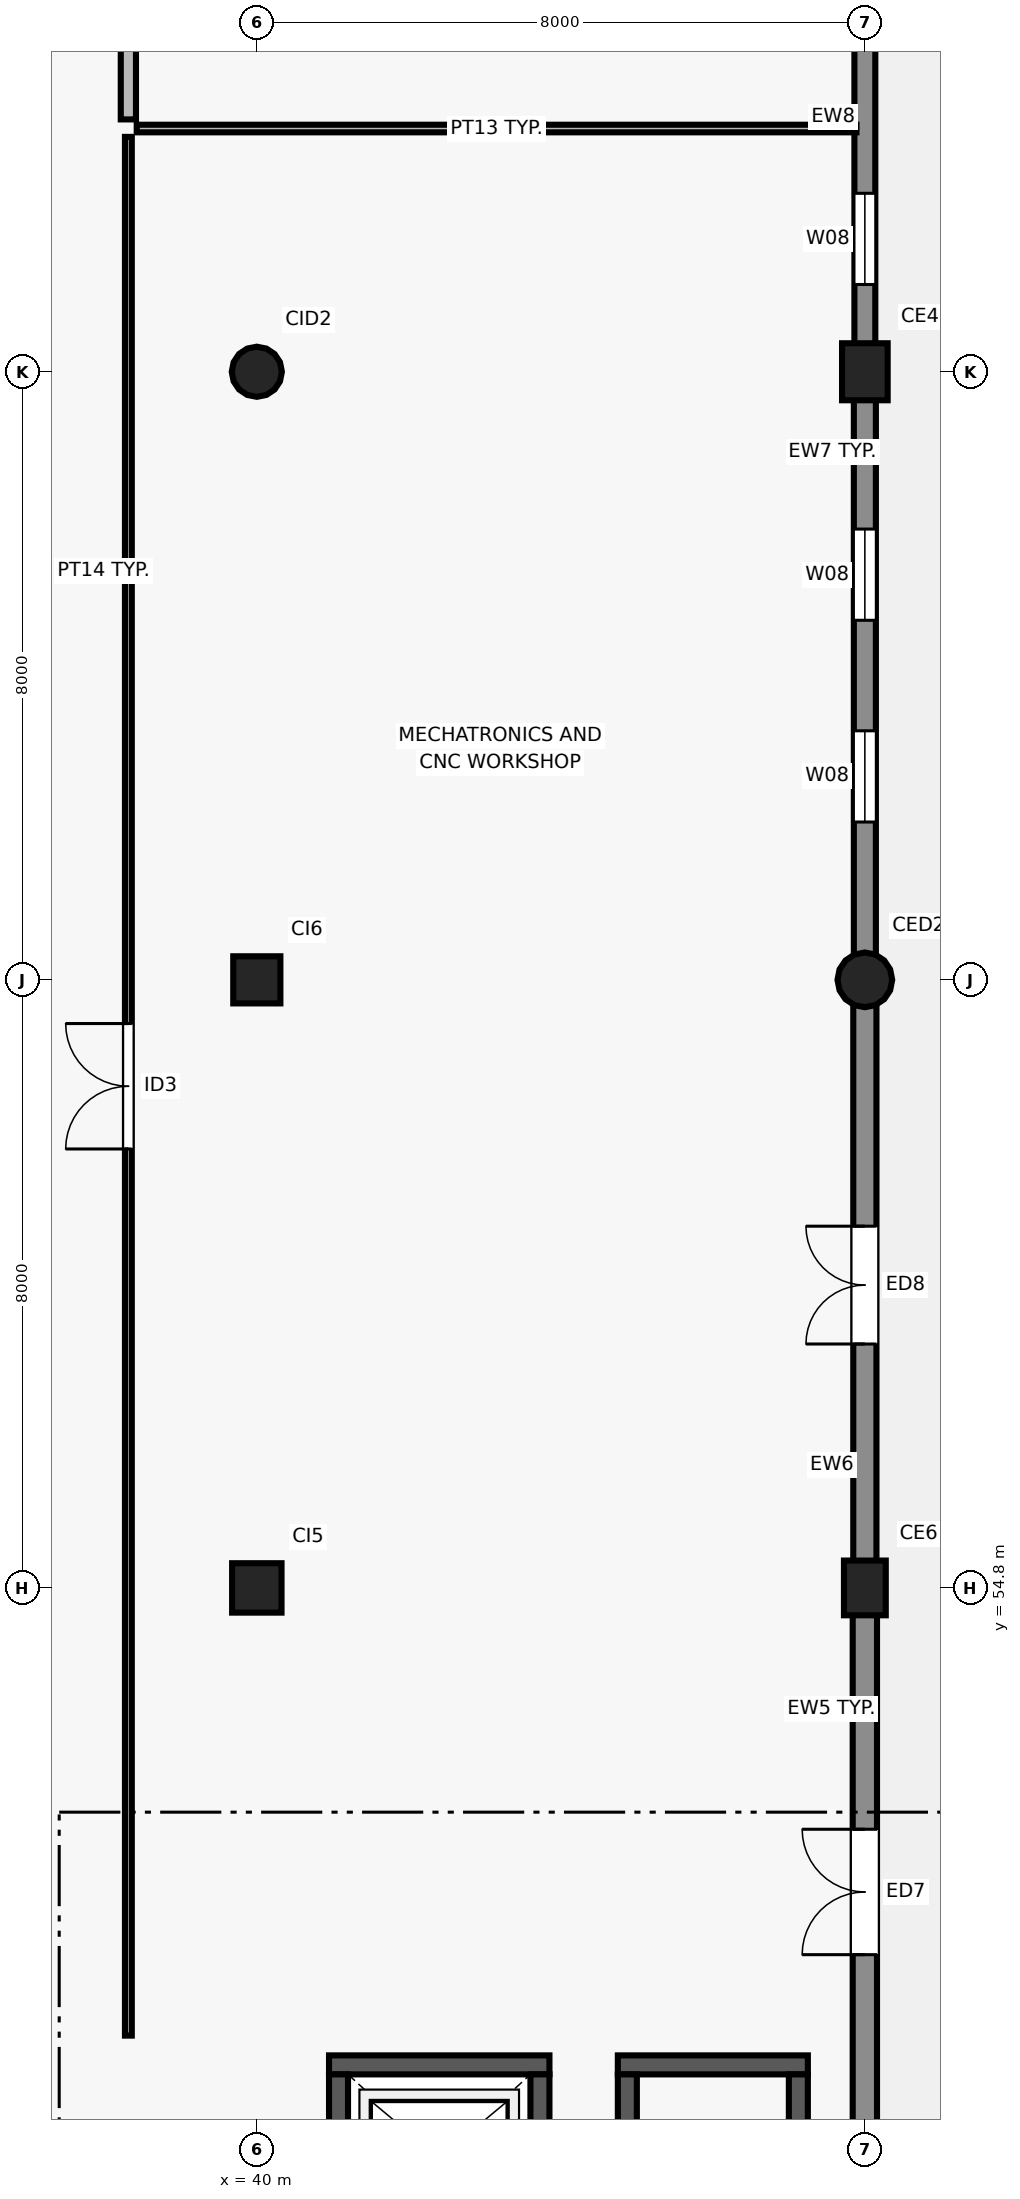
"""IFC4 building model, lengths in metres.
Left out: names, types, materials, properties, quantities, classifications, styles, units other than length and angle.
Written with IfcOpenShell. Run it as: python <this file> out.ifc"""

import sys

from ifc_helpers import new_model, si_unit, direction, frame, frame_2d, origin, origin_2d, place, context, subcontext, project, spatial, rectangle, circle, extrude, element, fill, save


model = new_model("IFC4")
c1 = context("Model", 3, precision=1e-05, world=origin(), true_north=direction((0.0, 1.0)))
c2 = subcontext(c1, "Body", "Model", "MODEL_VIEW")
j1 = project(units=[si_unit("LENGTHUNIT", "METRE"), si_unit("PLANEANGLEUNIT", "RADIAN")], contexts=[c1])
p1 = place(None, origin())
s1 = spatial("IfcSite", under=j1, at=p1, CompositionType="ELEMENT")
p2 = place(p1, origin())
s2 = spatial("IfcBuilding", under=s1, at=p2, CompositionType="ELEMENT")
p3 = place(p2, frame((0.0, 0.0, 9.0)))
s3 = spatial("IfcBuildingStorey", under=s2, at=p3, CompositionType="ELEMENT", Elevation=9.0)
p4 = place(p3, frame((40.0, 54.8, 0.0), z_axis=(0.0, 0.0, 1.0), x_axis=(1.0, 0.0, 0.0)))
e1 = element("IfcColumn", 1, at=p4, inside=s3, PredefinedType="COLUMN", context=c2, shape_type="SweptSolid", body=[
    extrude(rectangle(XDim=0.65, YDim=0.65, at=origin_2d()), origin(), (0.0, 0.0, 1.0), 4.2),
])
p5 = place(p3, frame((40.0, 62.8, 0.0), z_axis=(0.0, 0.0, 1.0), x_axis=(1.0, 0.0, 0.0)))
e2 = element("IfcColumn", 2, at=p5, inside=s3, PredefinedType="COLUMN", context=c2, shape_type="SweptSolid", body=[
    extrude(rectangle(XDim=0.62, YDim=0.62, at=origin_2d()), origin(), (0.0, 0.0, 1.0), 4.2),
])
p6 = place(p3, frame((40.0, 70.8, 0.0), z_axis=(0.0, 0.0, 1.0), x_axis=(1.0, 0.0, 0.0)))
e3 = element("IfcColumn", 3, at=p6, inside=s3, PredefinedType="COLUMN", context=c2, shape_type="SweptSolid", body=[
    extrude(circle(Radius=0.33, at=origin_2d()), origin(), (0.0, 0.0, 1.0), 4.2),
])
p7 = place(p3, frame((48.0, 54.8, 0.0), z_axis=(0.0, 0.0, 1.0), x_axis=(1.0, 0.0, 0.0)))
e4 = element("IfcColumn", 4, at=p7, inside=s3, PredefinedType="COLUMN", context=c2, shape_type="SweptSolid", body=[
    extrude(rectangle(XDim=0.72, YDim=0.55, at=origin_2d()), origin(), (0.0, 0.0, 1.0), 4.2),
])
p8 = place(p3, frame((48.0, 62.8, 0.0), z_axis=(0.0, 0.0, 1.0), x_axis=(1.0, 0.0, 0.0)))
e5 = element("IfcColumn", 5, at=p8, inside=s3, PredefinedType="COLUMN", context=c2, shape_type="SweptSolid", body=[
    extrude(circle(Radius=0.36, at=origin_2d()), origin(), (0.0, 0.0, 1.0), 4.2),
])
p9 = place(p3, frame((48.0, 70.8, 0.0), z_axis=(0.0, 0.0, 1.0), x_axis=(1.0, 0.0, 0.0)))
e6 = element("IfcColumn", 6, at=p9, inside=s3, PredefinedType="COLUMN", context=c2, shape_type="SweptSolid", body=[
    extrude(rectangle(XDim=0.75, YDim=0.6, at=origin_2d()), origin(), (0.0, 0.0, 1.0), 4.2),
])
p10 = place(p3, frame((48.0, 47.07, 0.0), z_axis=(0.0, 0.0, 1.0), x_axis=(0.0, 1.0, 0.0)))
e7 = element("IfcWall", 7, at=p10, inside=s3, PredefinedType="SOLIDWALL", context=c2, shape_type="SweptSolid", body=[
    extrude(rectangle(XDim=7.46, YDim=0.32, at=frame_2d((3.73, 0.0))), origin(), (0.0, 0.0, 1.0), 3.46),
])
p11 = place(p10, frame((2.905, 0.0, 0.0)))
e8 = element("IfcOpeningElement", 8, at=p11, cuts=e7, PredefinedType="OPENING", context=c2, shape_type="SweptSolid", body=[
    extrude(rectangle(XDim=1.65, YDim=2.2, at=frame_2d((0.825, 1.1))), frame((0.0, 0.17, 0.0), z_axis=(0.0, -1.0, 0.0), x_axis=(1.0, 0.0, 0.0)), (0.0, 0.0, 1.0), 0.34),
])
p12 = place(p3, frame((48.0, 55.07, 0.0), z_axis=(0.0, 0.0, 1.0), x_axis=(0.0, 1.0, 0.0)))
e9 = element("IfcWall", 9, at=p12, inside=s3, PredefinedType="SOLIDWALL", context=c2, shape_type="SweptSolid", body=[
    extrude(rectangle(XDim=7.427, YDim=0.305, at=frame_2d((3.714, 0.0))), origin(), (0.0, 0.0, 1.0), 3.48),
])
p13 = place(p12, frame((2.939, 0.0, 0.0)))
e10 = element("IfcOpeningElement", 10, at=p13, cuts=e9, PredefinedType="OPENING", context=c2, shape_type="SweptSolid", body=[
    extrude(rectangle(XDim=1.55, YDim=2.2, at=frame_2d((0.775, 1.1))), frame((0.0, 0.162, 0.0), z_axis=(0.0, -1.0, 0.0), x_axis=(1.0, 0.0, 0.0)), (0.0, 0.0, 1.0), 0.325),
])
p14 = place(p3, frame((48.0, 63.102, 0.0), z_axis=(0.0, 0.0, 1.0), x_axis=(0.0, 1.0, 0.0)))
e11 = element("IfcWall", 11, at=p14, inside=s3, PredefinedType="SOLIDWALL", context=c2, shape_type="SweptSolid", body=[
    extrude(rectangle(XDim=7.403, YDim=0.29, at=frame_2d((3.701, 0.0))), origin(), (0.0, 0.0, 1.0), 3.3),
])
p15 = place(p14, frame((1.774, 0.0, 0.9)))
e12 = element("IfcOpeningElement", 12, at=p15, cuts=e11, PredefinedType="OPENING", context=c2, shape_type="SweptSolid", body=[
    extrude(rectangle(XDim=1.2, YDim=1.8, at=frame_2d((0.6, 0.9))), frame((0.0, 0.155, 0.0), z_axis=(0.0, -1.0, 0.0), x_axis=(1.0, 0.0, 0.0)), (0.0, 0.0, 1.0), 0.31),
])
p16 = place(p14, frame((4.428, 0.0, 0.9)))
e13 = element("IfcOpeningElement", 13, at=p16, cuts=e11, PredefinedType="OPENING", context=c2, shape_type="SweptSolid", body=[
    extrude(rectangle(XDim=1.2, YDim=1.8, at=frame_2d((0.6, 0.9))), frame((0.0, 0.155, 0.0), z_axis=(0.0, -1.0, 0.0), x_axis=(1.0, 0.0, 0.0)), (0.0, 0.0, 1.0), 0.31),
])
p17 = place(p3, frame((48.0, 71.095, 0.0), z_axis=(0.0, 0.0, 1.0), x_axis=(0.0, 1.0, 0.0)))
e14 = element("IfcWall", 14, at=p17, inside=s3, PredefinedType="SOLIDWALL", context=c2, shape_type="SweptSolid", body=[
    extrude(rectangle(XDim=7.435, YDim=0.275, at=frame_2d((3.718, 0.0))), origin(), (0.0, 0.0, 1.0), 3.34),
])
p18 = place(p17, frame((0.853, 0.0, 0.9)))
e15 = element("IfcOpeningElement", 15, at=p18, cuts=e14, PredefinedType="OPENING", context=c2, shape_type="SweptSolid", body=[
    extrude(rectangle(XDim=1.2, YDim=1.8, at=frame_2d((0.6, 0.9))), frame((0.0, 0.147, 0.0), z_axis=(0.0, -1.0, 0.0), x_axis=(1.0, 0.0, 0.0)), (0.0, 0.0, 1.0), 0.295),
])
p19 = place(p17, frame((4.07, 0.0, 0.9)))
e16 = element("IfcOpeningElement", 16, at=p19, cuts=e14, PredefinedType="OPENING", context=c2, shape_type="SweptSolid", body=[
    extrude(rectangle(XDim=2.2, YDim=1.5, at=frame_2d((1.1, 0.75))), frame((0.0, 0.147, 0.0), z_axis=(0.0, -1.0, 0.0), x_axis=(1.0, 0.0, 0.0)), (0.0, 0.0, 1.0), 0.295),
])
p20 = place(p3, frame((40.95, 48.525, 0.0), z_axis=(0.0, 0.0, 1.0), x_axis=(1.0, 0.0, 0.0)))
e17 = element("IfcWall", 17, at=p20, inside=s3, PredefinedType="SHEAR", context=c2, shape_type="SweptSolid", body=[
    extrude(rectangle(XDim=2.9, YDim=0.25, at=frame_2d((1.45, 0.0))), origin(), (0.0, 0.0, 1.0), 3.92),
])
for number, where, z_axis, x_axis in (
    (18, (41.075, 46.2, 0.0), (0.0, 0.0, 1.0), (0.0, 1.0, 0.0)),
    (19, (43.725, 46.2, 0.0), (0.0, 0.0, 1.0), (0.0, 1.0, 0.0)),
):
    element("IfcWall", number, at=place(p3, frame(where, z_axis=z_axis, x_axis=x_axis)), inside=s3, PredefinedType="SHEAR", context=c2, shape_type="SweptSolid", body=[
        extrude(rectangle(XDim=2.2, YDim=0.25, at=frame_2d((1.1, 0.0))), origin(), (0.0, 0.0, 1.0), 3.92),
    ])
p21 = place(p3, frame((44.75, 48.525, 0.0), z_axis=(0.0, 0.0, 1.0), x_axis=(1.0, 0.0, 0.0)))
e20 = element("IfcWall", 20, at=p21, inside=s3, PredefinedType="SHEAR", context=c2, shape_type="SweptSolid", body=[
    extrude(rectangle(XDim=2.5, YDim=0.25, at=frame_2d((1.25, 0.0))), origin(), (0.0, 0.0, 1.0), 3.92),
])
for number, where, z_axis, x_axis in (
    (21, (44.875, 46.2, 0.0), (0.0, 0.0, 1.0), (0.0, 1.0, 0.0)),
    (22, (47.125, 46.2, 0.0), (0.0, 0.0, 1.0), (0.0, 1.0, 0.0)),
):
    element("IfcWall", number, at=place(p3, frame(where, z_axis=z_axis, x_axis=x_axis)), inside=s3, PredefinedType="SHEAR", context=c2, shape_type="SweptSolid", body=[
        extrude(rectangle(XDim=2.2, YDim=0.25, at=frame_2d((1.1, 0.0))), origin(), (0.0, 0.0, 1.0), 3.92),
    ])
p22 = place(p3, frame((38.42, 74.0, 0.0), z_axis=(0.0, 0.0, 1.0), x_axis=(1.0, 0.0, 0.0)))
e23 = element("IfcWall", 23, at=p22, inside=s3, PredefinedType="PARTITIONING", context=c2, shape_type="SweptSolid", body=[
    extrude(rectangle(XDim=9.47, YDim=0.1, at=frame_2d((4.735, 0.0))), origin(), (0.0, 0.0, 1.0), 3.9),
])
p23 = place(p3, frame((38.31, 48.91, 0.0), z_axis=(0.0, 0.0, 1.0), x_axis=(0.0, 1.0, 0.0)))
e24 = element("IfcWall", 24, at=p23, inside=s3, PredefinedType="PARTITIONING", context=c2, shape_type="SweptSolid", body=[
    extrude(rectangle(XDim=24.98, YDim=0.09, at=frame_2d((12.49, 0.0))), origin(), (0.0, 0.0, 1.0), 3.9),
])
p24 = place(p23, frame((11.665, 0.0, 0.0)))
e25 = element("IfcOpeningElement", 25, at=p24, cuts=e24, PredefinedType="OPENING", context=c2, shape_type="SweptSolid", body=[
    extrude(rectangle(XDim=1.65, YDim=2.3, at=frame_2d((0.825, 1.15))), frame((0.0, 0.055, 0.0), z_axis=(0.0, -1.0, 0.0), x_axis=(1.0, 0.0, 0.0)), (0.0, 0.0, 1.0), 0.11),
])
p25 = place(p3, frame((38.31, 74.12, 0.0), z_axis=(0.0, 0.0, 1.0), x_axis=(0.0, 1.0, 0.0)))
e26 = element("IfcWall", 26, at=p25, inside=s3, PredefinedType="SOLIDWALL", context=c2, shape_type="SweptSolid", body=[
    extrude(rectangle(XDim=23.77, YDim=0.2, at=frame_2d((11.885, 0.0))), origin(), (0.0, 0.0, 1.0), 3.9),
])
p26 = place(p25, frame((11.245, 0.0, 0.0)))
e27 = element("IfcOpeningElement", 27, at=p26, cuts=e26, PredefinedType="OPENING", context=c2, shape_type="SweptSolid", body=[
    extrude(rectangle(XDim=1.28, YDim=2.2, at=frame_2d((0.64, 1.1))), frame((0.0, 0.11, 0.0), z_axis=(0.0, -1.0, 0.0), x_axis=(1.0, 0.0, 0.0)), (0.0, 0.0, 1.0), 0.22),
])
p27 = place(p11, frame((1.65, 0.0, 0.0), z_axis=(0.0, 0.0, 1.0), x_axis=(-1.0, 0.0, 0.0)))
e28 = element("IfcDoor", 28, at=p27, inside=s3, OperationType="DOUBLE_DOOR_SINGLE_SWING", PredefinedType="DOOR", context=c2, shape_type="SweptSolid", body=[
    extrude(rectangle(XDim=1.65, YDim=2.2, at=frame_2d((0.825, 1.1))), frame((0.0, 0.025, 0.0), z_axis=(0.0, -1.0, 0.0), x_axis=(1.0, 0.0, 0.0)), (0.0, 0.0, 1.0), 0.05),
])
fill(e8, e28)
p28 = place(p13, frame((1.55, 0.0, 0.0), z_axis=(0.0, 0.0, 1.0), x_axis=(-1.0, 0.0, 0.0)))
e29 = element("IfcDoor", 29, at=p28, inside=s3, OperationType="DOUBLE_DOOR_SINGLE_SWING", PredefinedType="DOOR", context=c2, shape_type="SweptSolid", body=[
    extrude(rectangle(XDim=1.55, YDim=2.2, at=frame_2d((0.775, 1.1))), frame((0.0, 0.025, 0.0), z_axis=(0.0, -1.0, 0.0), x_axis=(1.0, 0.0, 0.0)), (0.0, 0.0, 1.0), 0.05),
])
fill(e10, e29)
p29 = place(p15, origin())
e30 = element("IfcWindow", 30, at=p29, inside=s3, PartitioningType="SINGLE_PANEL", PredefinedType="WINDOW", context=c2, shape_type="SweptSolid", body=[
    extrude(rectangle(XDim=1.2, YDim=1.8, at=frame_2d((0.6, 0.9))), frame((0.0, 0.03, 0.0), z_axis=(0.0, -1.0, 0.0), x_axis=(1.0, 0.0, 0.0)), (0.0, 0.0, 1.0), 0.06),
])
fill(e12, e30)
p30 = place(p16, origin())
e31 = element("IfcWindow", 31, at=p30, inside=s3, PartitioningType="SINGLE_PANEL", PredefinedType="WINDOW", context=c2, shape_type="SweptSolid", body=[
    extrude(rectangle(XDim=1.2, YDim=1.8, at=frame_2d((0.6, 0.9))), frame((0.0, 0.03, 0.0), z_axis=(0.0, -1.0, 0.0), x_axis=(1.0, 0.0, 0.0)), (0.0, 0.0, 1.0), 0.06),
])
fill(e13, e31)
p31 = place(p18, origin())
e32 = element("IfcWindow", 32, at=p31, inside=s3, PartitioningType="SINGLE_PANEL", PredefinedType="WINDOW", context=c2, shape_type="SweptSolid", body=[
    extrude(rectangle(XDim=1.2, YDim=1.8, at=frame_2d((0.6, 0.9))), frame((0.0, 0.03, 0.0), z_axis=(0.0, -1.0, 0.0), x_axis=(1.0, 0.0, 0.0)), (0.0, 0.0, 1.0), 0.06),
])
fill(e15, e32)
p32 = place(p24, origin())
e33 = element("IfcDoor", 33, at=p32, inside=s3, OperationType="DOUBLE_DOOR_SINGLE_SWING", PredefinedType="DOOR", context=c2, shape_type="SweptSolid", body=[
    extrude(rectangle(XDim=1.65, YDim=2.3, at=frame_2d((0.825, 1.15))), frame((0.0, 0.025, 0.0), z_axis=(0.0, -1.0, 0.0), x_axis=(1.0, 0.0, 0.0)), (0.0, 0.0, 1.0), 0.05),
])
fill(e25, e33)
save(model, sys.argv[1])
